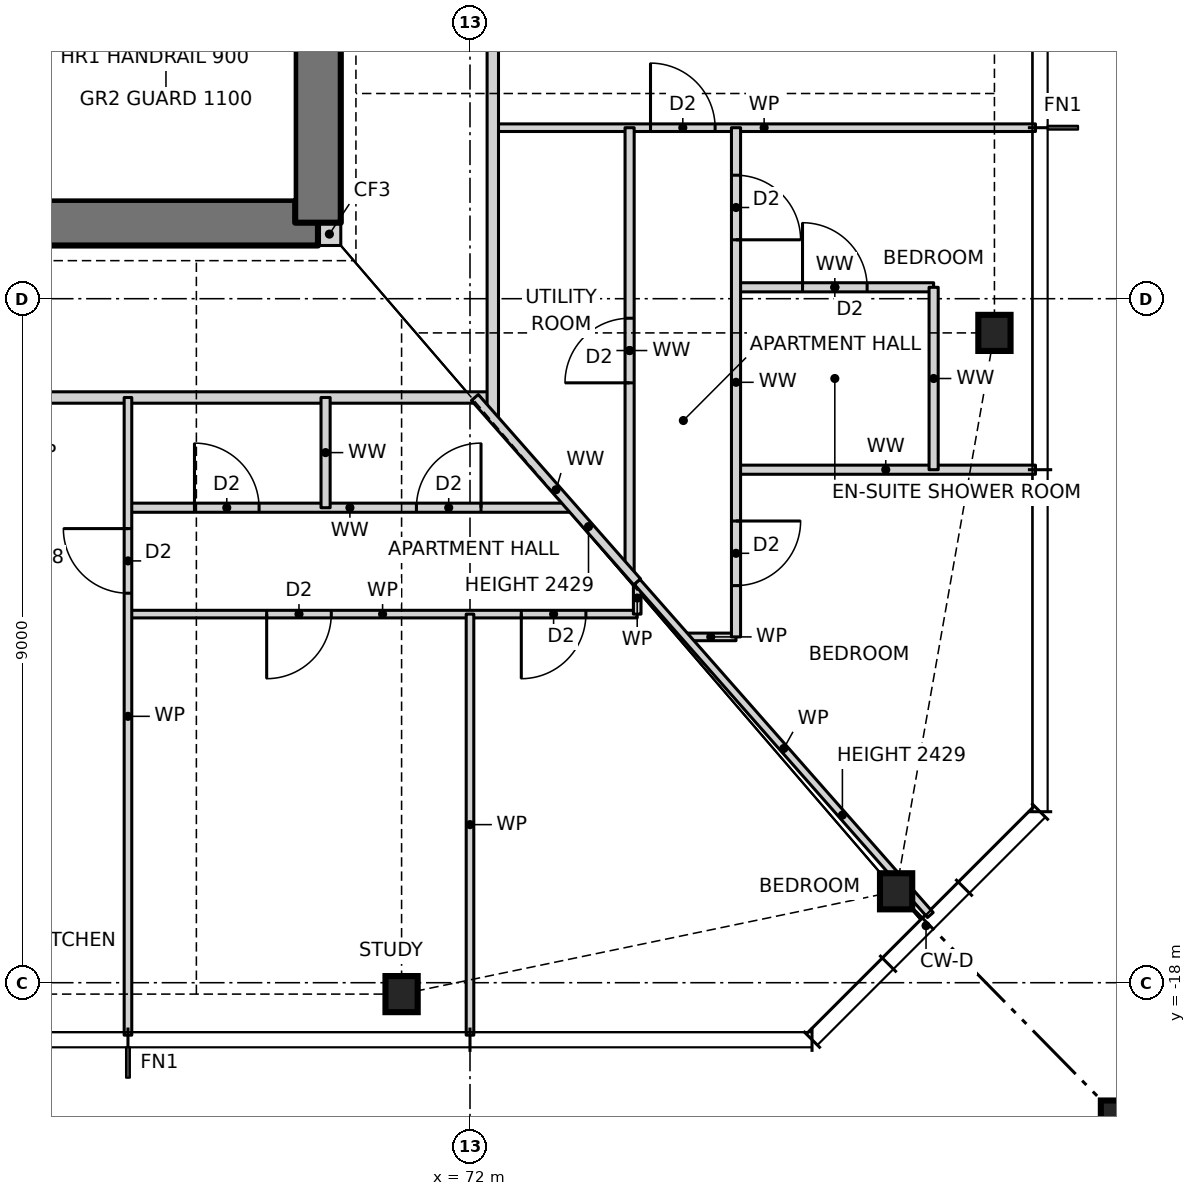
"""IFC4 building model, lengths in metres.
Left out: names, types, materials, properties, quantities, classifications, styles, units other than length and angle.
Written with IfcOpenShell. Run it as: python <this file> out.ifc"""

import sys

from ifc_helpers import new_model, si_unit, direction, frame, frame_2d, origin, origin_2d, place, context, subcontext, project, spatial, rectangle, hollow_rectangle, i_section, extrude, element, fill, save


model = new_model("IFC4")
c1 = context("Model", 3, precision=1e-05, world=origin(), true_north=direction((0.0, 1.0)))
c2 = subcontext(c1, "Body", "Model", "MODEL_VIEW")
j1 = project(units=[si_unit("LENGTHUNIT", "METRE"), si_unit("PLANEANGLEUNIT", "RADIAN")], contexts=[c1])
p1 = place(None, origin())
s1 = spatial("IfcSite", under=j1, at=p1, CompositionType="ELEMENT")
p2 = place(p1, origin())
s2 = spatial("IfcBuilding", under=s1, at=p2, CompositionType="ELEMENT")
p3 = place(p2, frame((0.0, 0.0, 67.5)))
s3 = spatial("IfcBuildingStorey", under=s2, at=p3, CompositionType="ELEMENT", Elevation=67.5)
for number, where, z_axis, x_axis in (
    (1, (71.1, -18.15, 0.0), (0.0, 0.0, 1.0), (1.0, 0.0, 0.0)),
    (2, (77.606, -16.797, 0.0), (0.0, 0.0, 1.0), (1.0, 0.0, 0.0)),
    (3, (78.9, -9.45, 0.0), (0.0, 0.0, 1.0), (1.0, 0.0, 0.0)),
):
    element("IfcColumn", number, at=place(p3, frame(where, z_axis=z_axis, x_axis=x_axis)), inside=s3, PredefinedType="COLUMN", context=c2, shape_type="SweptSolid", body=[
        extrude(i_section(OverallWidth=0.424, OverallDepth=0.475, WebThickness=0.048, FlangeThickness=0.077, at=origin_2d()), origin(), (0.0, 0.0, 1.0), 3.5),
    ])
p4 = place(p3, frame((80.9, -20.15, 0.0), z_axis=(0.0, 0.0, 1.0), x_axis=(1.0, 0.0, 0.0)))
e4 = element("IfcColumn", 4, at=p4, inside=s3, PredefinedType="COLUMN", context=c2, shape_type="SweptSolid", body=[
    extrude(hollow_rectangle(XDim=1.2, YDim=1.2, WallThickness=0.07, at=origin_2d()), origin(), (0.0, 0.0, 1.0), 3.5),
])
p5 = place(p3, frame((70.0, -8.15, 0.0), z_axis=(0.0, 0.0, 1.0), x_axis=(1.0, 0.0, 0.0)))
e5 = element("IfcWall", 5, at=p5, inside=s3, PredefinedType="SOLIDWALL", context=c2, shape_type="SweptSolid", body=[
    extrude(rectangle(XDim=0.3, YDim=0.3, at=frame_2d((0.15, 0.0))), origin(), (0.0, 0.0, 1.0), 3.5),
])
p6 = place(p3, frame((56.0, -8.0, 0.0), z_axis=(0.0, 0.0, 1.0), x_axis=(1.0, 0.0, 0.0)))
e6 = element("IfcWall", 6, at=p6, inside=s3, PredefinedType="SHEAR", context=c2, shape_type="SweptSolid", body=[
    extrude(rectangle(XDim=14.0, YDim=0.6, at=frame_2d((7.0, 0.0))), origin(), (0.0, 0.0, 1.0), 3.5),
])
p7 = place(p6, frame((2.7, 0.0, 0.0)))
e7 = element("IfcOpeningElement", 7, at=p7, cuts=e6, PredefinedType="OPENING", context=c2, shape_type="SweptSolid", body=[
    extrude(rectangle(XDim=0.9, YDim=2.1, at=frame_2d((0.45, 1.05))), frame((0.0, 0.31, 0.0), z_axis=(0.0, -1.0, 0.0), x_axis=(1.0, 0.0, 0.0)), (0.0, 0.0, 1.0), 0.62),
])
p8 = place(p6, frame((7.7, 0.0, 0.0)))
e8 = element("IfcOpeningElement", 8, at=p8, cuts=e6, PredefinedType="OPENING", context=c2, shape_type="SweptSolid", body=[
    extrude(rectangle(XDim=0.9, YDim=2.1, at=frame_2d((0.45, 1.05))), frame((0.0, 0.31, 0.0), z_axis=(0.0, -1.0, 0.0), x_axis=(1.0, 0.0, 0.0)), (0.0, 0.0, 1.0), 0.62),
])
p9 = place(p3, frame((70.0, -8.0, 0.0), z_axis=(0.0, 0.0, 1.0), x_axis=(0.0, 1.0, 0.0)))
e9 = element("IfcWall", 9, at=p9, inside=s3, PredefinedType="SHEAR", context=c2, shape_type="SweptSolid", body=[
    extrude(rectangle(XDim=16.0, YDim=0.6, at=frame_2d((8.0, 0.0))), origin(), (0.0, 0.0, 1.0), 3.5),
])
p10 = place(p9, frame((7.5, 0.0, 0.0)))
e10 = element("IfcOpeningElement", 10, at=p10, cuts=e9, PredefinedType="OPENING", context=c2, shape_type="SweptSolid", body=[
    extrude(rectangle(XDim=1.0, YDim=2.1, at=frame_2d((0.5, 1.05))), frame((0.0, 0.31, 0.0), z_axis=(0.0, -1.0, 0.0), x_axis=(1.0, 0.0, 0.0)), (0.0, 0.0, 1.0), 0.62),
])
p11 = place(p3, frame((74.836, -13.45, 0.0), z_axis=(0.0, 0.0, 1.0), x_axis=(1.0, 0.0, 0.0)))
e11 = element("IfcWall", 11, at=p11, inside=s3, PredefinedType="PARTITIONING", context=c2, shape_type="SweptSolid", body=[
    extrude(rectangle(XDim=0.664, YDim=0.1, at=frame_2d((0.332, 0.0))), origin(), (0.0, 0.0, 1.0), 3.27),
])
p12 = place(p3, frame((67.5, -13.15, 0.0), z_axis=(0.0, 0.0, 1.0), x_axis=(1.0, 0.0, 0.0)))
e12 = element("IfcWall", 12, at=p12, inside=s3, PredefinedType="PARTITIONING", context=c2, shape_type="SweptSolid", body=[
    extrude(rectangle(XDim=6.7, YDim=0.1, at=frame_2d((3.35, 0.0))), origin(), (0.0, 0.0, 1.0), 3.27),
])
p13 = place(p12, frame((1.825, 0.0, 0.0)))
e13 = element("IfcOpeningElement", 13, at=p13, cuts=e12, PredefinedType="OPENING", context=c2, shape_type="SweptSolid", body=[
    extrude(rectangle(XDim=0.85, YDim=2.1, at=frame_2d((0.425, 1.05))), frame((0.0, 0.06, 0.0), z_axis=(0.0, -1.0, 0.0), x_axis=(1.0, 0.0, 0.0)), (0.0, 0.0, 1.0), 0.12),
])
p14 = place(p12, frame((5.175, 0.0, 0.0)))
e14 = element("IfcOpeningElement", 14, at=p14, cuts=e12, PredefinedType="OPENING", context=c2, shape_type="SweptSolid", body=[
    extrude(rectangle(XDim=0.85, YDim=2.1, at=frame_2d((0.425, 1.05))), frame((0.0, 0.06, 0.0), z_axis=(0.0, -1.0, 0.0), x_axis=(1.0, 0.0, 0.0)), (0.0, 0.0, 1.0), 0.12),
])
p15 = place(p3, frame((67.5, -11.75, 0.0), z_axis=(0.0, 0.0, 1.0), x_axis=(1.0, 0.0, 0.0)))
e15 = element("IfcWall", 15, at=p15, inside=s3, PredefinedType="PARTITIONING", context=c2, shape_type="SweptSolid", body=[
    extrude(rectangle(XDim=5.84, YDim=0.12, at=frame_2d((2.92, 0.0))), origin(), (0.0, 0.0, 1.0), 3.27),
])
p16 = place(p15, frame((0.875, 0.0, 0.0)))
e16 = element("IfcOpeningElement", 16, at=p16, cuts=e15, PredefinedType="OPENING", context=c2, shape_type="SweptSolid", body=[
    extrude(rectangle(XDim=0.85, YDim=2.1, at=frame_2d((0.425, 1.05))), frame((0.0, 0.07, 0.0), z_axis=(0.0, -1.0, 0.0), x_axis=(1.0, 0.0, 0.0)), (0.0, 0.0, 1.0), 0.14),
])
p17 = place(p15, frame((3.795, 0.0, 0.0)))
e17 = element("IfcOpeningElement", 17, at=p17, cuts=e15, PredefinedType="OPENING", context=c2, shape_type="SweptSolid", body=[
    extrude(rectangle(XDim=0.85, YDim=2.1, at=frame_2d((0.425, 1.05))), frame((0.0, 0.07, 0.0), z_axis=(0.0, -1.0, 0.0), x_axis=(1.0, 0.0, 0.0)), (0.0, 0.0, 1.0), 0.14),
])
p18 = place(p3, frame((75.5, -11.25, 0.0), z_axis=(0.0, 0.0, 1.0), x_axis=(1.0, 0.0, 0.0)))
e18 = element("IfcWall", 18, at=p18, inside=s3, PredefinedType="PARTITIONING", context=c2, shape_type="SweptSolid", body=[
    extrude(rectangle(XDim=3.94, YDim=0.12, at=frame_2d((1.97, 0.0))), origin(), (0.0, 0.0, 1.0), 3.27),
])
p19 = place(p3, frame((53.7, -10.3, 0.0), z_axis=(0.0, 0.0, 1.0), x_axis=(1.0, 0.0, 0.0)))
e19 = element("IfcWall", 19, at=p19, inside=s3, PredefinedType="PARTITIONING", context=c2, shape_type="SweptSolid", body=[
    extrude(rectangle(XDim=18.6, YDim=0.15, at=frame_2d((9.3, 0.0))), origin(), (0.0, 0.0, 1.0), 3.27),
])
p20 = place(p19, frame((4.8, 0.0, 0.0)))
e20 = element("IfcOpeningElement", 20, at=p20, cuts=e19, PredefinedType="OPENING", context=c2, shape_type="SweptSolid", body=[
    extrude(rectangle(XDim=1.0, YDim=2.1, at=frame_2d((0.5, 1.05))), frame((0.0, 0.085, 0.0), z_axis=(0.0, -1.0, 0.0), x_axis=(1.0, 0.0, 0.0)), (0.0, 0.0, 1.0), 0.17),
])
p21 = place(p19, frame((10.2, 0.0, 0.0)))
e21 = element("IfcOpeningElement", 21, at=p21, cuts=e19, PredefinedType="OPENING", context=c2, shape_type="SweptSolid", body=[
    extrude(rectangle(XDim=1.0, YDim=2.1, at=frame_2d((0.5, 1.05))), frame((0.0, 0.085, 0.0), z_axis=(0.0, -1.0, 0.0), x_axis=(1.0, 0.0, 0.0)), (0.0, 0.0, 1.0), 0.17),
])
p22 = place(p3, frame((75.5, -8.85, 0.0), z_axis=(0.0, 0.0, 1.0), x_axis=(1.0, 0.0, 0.0)))
e22 = element("IfcWall", 22, at=p22, inside=s3, PredefinedType="PARTITIONING", context=c2, shape_type="SweptSolid", body=[
    extrude(rectangle(XDim=2.6, YDim=0.12, at=frame_2d((1.3, 0.0))), origin(), (0.0, 0.0, 1.0), 3.27),
])
p23 = place(p22, frame((0.875, 0.0, 0.0)))
e23 = element("IfcOpeningElement", 23, at=p23, cuts=e22, PredefinedType="OPENING", context=c2, shape_type="SweptSolid", body=[
    extrude(rectangle(XDim=0.85, YDim=2.1, at=frame_2d((0.425, 1.05))), frame((0.0, 0.07, 0.0), z_axis=(0.0, -1.0, 0.0), x_axis=(1.0, 0.0, 0.0)), (0.0, 0.0, 1.0), 0.14),
])
p24 = place(p3, frame((72.3, -6.75, 0.0), z_axis=(0.0, 0.0, 1.0), x_axis=(1.0, 0.0, 0.0)))
e24 = element("IfcWall", 24, at=p24, inside=s3, PredefinedType="PARTITIONING", context=c2, shape_type="SweptSolid", body=[
    extrude(rectangle(XDim=7.14, YDim=0.1, at=frame_2d((3.57, 0.0))), origin(), (0.0, 0.0, 1.0), 3.27),
])
p25 = place(p24, frame((2.075, 0.0, 0.0)))
e25 = element("IfcOpeningElement", 25, at=p25, cuts=e24, PredefinedType="OPENING", context=c2, shape_type="SweptSolid", body=[
    extrude(rectangle(XDim=0.85, YDim=2.1, at=frame_2d((0.425, 1.05))), frame((0.0, 0.06, 0.0), z_axis=(0.0, -1.0, 0.0), x_axis=(1.0, 0.0, 0.0)), (0.0, 0.0, 1.0), 0.12),
])
p26 = place(p3, frame((78.1, -11.25, 0.0), z_axis=(0.0, 0.0, 1.0), x_axis=(0.0, 1.0, 0.0)))
e26 = element("IfcWall", 26, at=p26, inside=s3, PredefinedType="PARTITIONING", context=c2, shape_type="SweptSolid", body=[
    extrude(rectangle(XDim=2.4, YDim=0.12, at=frame_2d((1.2, 0.0))), origin(), (0.0, 0.0, 1.0), 3.27),
])
p27 = place(p3, frame((75.5, -13.45, 0.0), z_axis=(0.0, 0.0, 1.0), x_axis=(0.0, 1.0, 0.0)))
e27 = element("IfcWall", 27, at=p27, inside=s3, PredefinedType="PARTITIONING", context=c2, shape_type="SweptSolid", body=[
    extrude(rectangle(XDim=6.7, YDim=0.12, at=frame_2d((3.35, 0.0))), origin(), (0.0, 0.0, 1.0), 3.27),
])
p28 = place(p27, frame((5.225, 0.0, 0.0)))
e28 = element("IfcOpeningElement", 28, at=p28, cuts=e27, PredefinedType="OPENING", context=c2, shape_type="SweptSolid", body=[
    extrude(rectangle(XDim=0.85, YDim=2.1, at=frame_2d((0.425, 1.05))), frame((0.0, 0.07, 0.0), z_axis=(0.0, -1.0, 0.0), x_axis=(1.0, 0.0, 0.0)), (0.0, 0.0, 1.0), 0.14),
])
p29 = place(p27, frame((0.675, 0.0, 0.0)))
e29 = element("IfcOpeningElement", 29, at=p29, cuts=e27, PredefinedType="OPENING", context=c2, shape_type="SweptSolid", body=[
    extrude(rectangle(XDim=0.85, YDim=2.1, at=frame_2d((0.425, 1.05))), frame((0.0, 0.07, 0.0), z_axis=(0.0, -1.0, 0.0), x_axis=(1.0, 0.0, 0.0)), (0.0, 0.0, 1.0), 0.14),
])
p30 = place(p3, frame((74.2, -13.15, 0.0), z_axis=(0.0, 0.0, 1.0), x_axis=(0.0, 1.0, 0.0)))
e30 = element("IfcWall", 30, at=p30, inside=s3, PredefinedType="PARTITIONING", context=c2, shape_type="SweptSolid", body=[
    extrude(rectangle(XDim=0.423, YDim=0.1, at=frame_2d((0.211, 0.0))), origin(), (0.0, 0.0, 1.0), 3.27),
])
p31 = place(p3, frame((74.1, -12.614, 0.0), z_axis=(0.0, 0.0, 1.0), x_axis=(0.0, 1.0, 0.0)))
e31 = element("IfcWall", 31, at=p31, inside=s3, PredefinedType="PARTITIONING", context=c2, shape_type="SweptSolid", body=[
    extrude(rectangle(XDim=5.864, YDim=0.12, at=frame_2d((2.932, 0.0))), origin(), (0.0, 0.0, 1.0), 3.27),
])
p32 = place(p31, frame((2.507, 0.0, 0.0)))
e32 = element("IfcOpeningElement", 32, at=p32, cuts=e31, PredefinedType="OPENING", context=c2, shape_type="SweptSolid", body=[
    extrude(rectangle(XDim=0.85, YDim=2.1, at=frame_2d((0.425, 1.05))), frame((0.0, 0.07, 0.0), z_axis=(0.0, -1.0, 0.0), x_axis=(1.0, 0.0, 0.0)), (0.0, 0.0, 1.0), 0.14),
])
p33 = place(p3, frame((72.3, -10.568, 0.0), z_axis=(0.0, 0.0, 1.0), x_axis=(0.0, 1.0, 0.0)))
e33 = element("IfcWall", 33, at=p33, inside=s3, PredefinedType="PARTITIONING", context=c2, shape_type="SweptSolid", body=[
    extrude(rectangle(XDim=21.136, YDim=0.15, at=frame_2d((10.568, 0.0))), origin(), (0.0, 0.0, 1.0), 3.27),
])
p34 = place(p33, frame((10.068, 0.0, 0.0)))
e34 = element("IfcOpeningElement", 34, at=p34, cuts=e33, PredefinedType="OPENING", context=c2, shape_type="SweptSolid", body=[
    extrude(rectangle(XDim=1.0, YDim=2.1, at=frame_2d((0.5, 1.05))), frame((0.0, 0.085, 0.0), z_axis=(0.0, -1.0, 0.0), x_axis=(1.0, 0.0, 0.0)), (0.0, 0.0, 1.0), 0.17),
])
p35 = place(p3, frame((72.0, -18.69, 0.0), z_axis=(0.0, 0.0, 1.0), x_axis=(0.0, 1.0, 0.0)))
e35 = element("IfcWall", 35, at=p35, inside=s3, PredefinedType="PARTITIONING", context=c2, shape_type="SweptSolid", body=[
    extrude(rectangle(XDim=5.54, YDim=0.1, at=frame_2d((2.77, 0.0))), origin(), (0.0, 0.0, 1.0), 3.27),
])
p36 = place(p3, frame((70.1, -11.75, 0.0), z_axis=(0.0, 0.0, 1.0), x_axis=(0.0, 1.0, 0.0)))
e36 = element("IfcWall", 36, at=p36, inside=s3, PredefinedType="PARTITIONING", context=c2, shape_type="SweptSolid", body=[
    extrude(rectangle(XDim=1.45, YDim=0.12, at=frame_2d((0.725, 0.0))), origin(), (0.0, 0.0, 1.0), 3.27),
])
p37 = place(p3, frame((67.5, -18.69, 0.0), z_axis=(0.0, 0.0, 1.0), x_axis=(0.0, 1.0, 0.0)))
e37 = element("IfcWall", 37, at=p37, inside=s3, PredefinedType="PARTITIONING", context=c2, shape_type="SweptSolid", body=[
    extrude(rectangle(XDim=8.39, YDim=0.1, at=frame_2d((4.195, 0.0))), origin(), (0.0, 0.0, 1.0), 3.27),
])
p38 = place(p37, frame((5.815, 0.0, 0.0)))
e38 = element("IfcOpeningElement", 38, at=p38, cuts=e37, PredefinedType="OPENING", context=c2, shape_type="SweptSolid", body=[
    extrude(rectangle(XDim=0.85, YDim=2.1, at=frame_2d((0.425, 1.05))), frame((0.0, 0.06, 0.0), z_axis=(0.0, -1.0, 0.0), x_axis=(1.0, 0.0, 0.0)), (0.0, 0.0, 1.0), 0.12),
])
p39 = place(p3, frame((74.2, -12.727, 0.0), z_axis=(0.0, 0.0, 1.0), x_axis=(-0.660667046586, 0.75067906162, 0.0)))
e39 = element("IfcWall", 39, at=p39, inside=s3, PredefinedType="PARTITIONING", context=c2, shape_type="SweptSolid", body=[
    extrude(rectangle(XDim=3.233, YDim=0.12, at=frame_2d((1.617, 0.0))), origin(), (0.0, 0.0, 1.0), 2.429),
])
p40 = place(p3, frame((78.057, -17.109, 0.0), z_axis=(0.0, 0.0, 1.0), x_axis=(-0.660698595885, 0.750651294141, 0.0)))
e40 = element("IfcWall", 40, at=p40, inside=s3, PredefinedType="PARTITIONING", context=c2, shape_type="SweptSolid", body=[
    extrude(rectangle(XDim=5.838, YDim=0.1, at=frame_2d((2.919, 0.0))), origin(), (0.0, 0.0, 1.0), 2.429),
])
p41 = place(p38, origin())
e41 = element("IfcDoor", 41, at=p41, inside=s3, OperationType="SINGLE_SWING_RIGHT", PredefinedType="DOOR", context=c2, shape_type="SweptSolid", body=[
    extrude(rectangle(XDim=0.85, YDim=2.1, at=frame_2d((0.425, 1.05))), frame((0.0, 0.025, 0.0), z_axis=(0.0, -1.0, 0.0), x_axis=(1.0, 0.0, 0.0)), (0.0, 0.0, 1.0), 0.05),
])
fill(e38, e41)
p42 = place(p13, frame((0.85, 0.0, 0.0), z_axis=(0.0, 0.0, 1.0), x_axis=(-1.0, 0.0, 0.0)))
e42 = element("IfcDoor", 42, at=p42, inside=s3, OperationType="SINGLE_SWING_RIGHT", PredefinedType="DOOR", context=c2, shape_type="SweptSolid", body=[
    extrude(rectangle(XDim=0.85, YDim=2.1, at=frame_2d((0.425, 1.05))), frame((0.0, 0.025, 0.0), z_axis=(0.0, -1.0, 0.0), x_axis=(1.0, 0.0, 0.0)), (0.0, 0.0, 1.0), 0.05),
])
fill(e13, e42)
p43 = place(p14, frame((0.85, 0.0, 0.0), z_axis=(0.0, 0.0, 1.0), x_axis=(-1.0, 0.0, 0.0)))
e43 = element("IfcDoor", 43, at=p43, inside=s3, OperationType="SINGLE_SWING_RIGHT", PredefinedType="DOOR", context=c2, shape_type="SweptSolid", body=[
    extrude(rectangle(XDim=0.85, YDim=2.1, at=frame_2d((0.425, 1.05))), frame((0.0, 0.025, 0.0), z_axis=(0.0, -1.0, 0.0), x_axis=(1.0, 0.0, 0.0)), (0.0, 0.0, 1.0), 0.05),
])
fill(e14, e43)
p44 = place(p16, origin())
e44 = element("IfcDoor", 44, at=p44, inside=s3, OperationType="SINGLE_SWING_LEFT", PredefinedType="DOOR", context=c2, shape_type="SweptSolid", body=[
    extrude(rectangle(XDim=0.85, YDim=2.1, at=frame_2d((0.425, 1.05))), frame((0.0, 0.025, 0.0), z_axis=(0.0, -1.0, 0.0), x_axis=(1.0, 0.0, 0.0)), (0.0, 0.0, 1.0), 0.05),
])
fill(e16, e44)
p45 = place(p17, origin())
e45 = element("IfcDoor", 45, at=p45, inside=s3, OperationType="SINGLE_SWING_RIGHT", PredefinedType="DOOR", context=c2, shape_type="SweptSolid", body=[
    extrude(rectangle(XDim=0.85, YDim=2.1, at=frame_2d((0.425, 1.05))), frame((0.0, 0.025, 0.0), z_axis=(0.0, -1.0, 0.0), x_axis=(1.0, 0.0, 0.0)), (0.0, 0.0, 1.0), 0.05),
])
fill(e17, e45)
p46 = place(p25, origin())
e46 = element("IfcDoor", 46, at=p46, inside=s3, OperationType="SINGLE_SWING_LEFT", PredefinedType="DOOR", context=c2, shape_type="SweptSolid", body=[
    extrude(rectangle(XDim=0.85, YDim=2.1, at=frame_2d((0.425, 1.05))), frame((0.0, 0.025, 0.0), z_axis=(0.0, -1.0, 0.0), x_axis=(1.0, 0.0, 0.0)), (0.0, 0.0, 1.0), 0.05),
])
fill(e25, e46)
p47 = place(p23, origin())
e47 = element("IfcDoor", 47, at=p47, inside=s3, OperationType="SINGLE_SWING_LEFT", PredefinedType="DOOR", context=c2, shape_type="SweptSolid", body=[
    extrude(rectangle(XDim=0.85, YDim=2.1, at=frame_2d((0.425, 1.05))), frame((0.0, 0.025, 0.0), z_axis=(0.0, -1.0, 0.0), x_axis=(1.0, 0.0, 0.0)), (0.0, 0.0, 1.0), 0.05),
])
fill(e23, e47)
p48 = place(p28, frame((0.85, 0.0, 0.0), z_axis=(0.0, 0.0, 1.0), x_axis=(-1.0, 0.0, 0.0)))
e48 = element("IfcDoor", 48, at=p48, inside=s3, OperationType="SINGLE_SWING_RIGHT", PredefinedType="DOOR", context=c2, shape_type="SweptSolid", body=[
    extrude(rectangle(XDim=0.85, YDim=2.1, at=frame_2d((0.425, 1.05))), frame((0.0, 0.025, 0.0), z_axis=(0.0, -1.0, 0.0), x_axis=(1.0, 0.0, 0.0)), (0.0, 0.0, 1.0), 0.05),
])
fill(e28, e48)
p49 = place(p29, frame((0.85, 0.0, 0.0), z_axis=(0.0, 0.0, 1.0), x_axis=(-1.0, 0.0, 0.0)))
e49 = element("IfcDoor", 49, at=p49, inside=s3, OperationType="SINGLE_SWING_LEFT", PredefinedType="DOOR", context=c2, shape_type="SweptSolid", body=[
    extrude(rectangle(XDim=0.85, YDim=2.1, at=frame_2d((0.425, 1.05))), frame((0.0, 0.025, 0.0), z_axis=(0.0, -1.0, 0.0), x_axis=(1.0, 0.0, 0.0)), (0.0, 0.0, 1.0), 0.05),
])
fill(e29, e49)
p50 = place(p32, origin())
e50 = element("IfcDoor", 50, at=p50, inside=s3, OperationType="SINGLE_SWING_LEFT", PredefinedType="DOOR", context=c2, shape_type="SweptSolid", body=[
    extrude(rectangle(XDim=0.85, YDim=2.1, at=frame_2d((0.425, 1.05))), frame((0.0, 0.025, 0.0), z_axis=(0.0, -1.0, 0.0), x_axis=(1.0, 0.0, 0.0)), (0.0, 0.0, 1.0), 0.05),
])
fill(e32, e50)
save(model, sys.argv[1])
